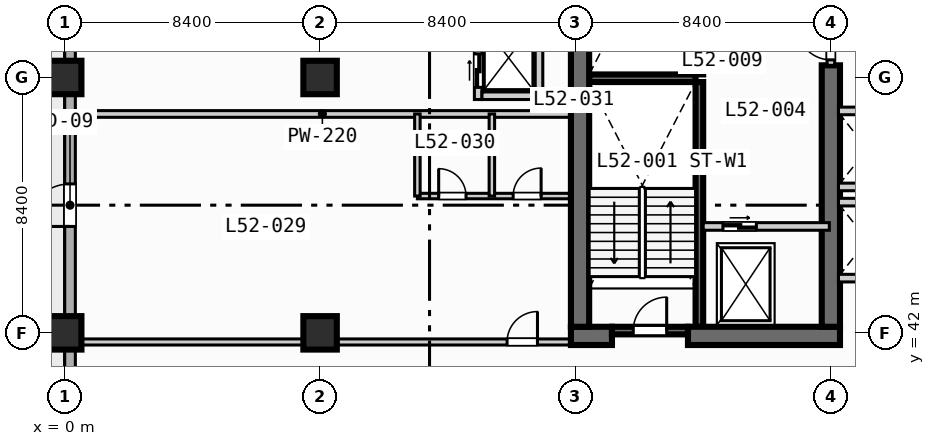
"""IFC4 building model, lengths in metres.
Left out: names, types, materials, properties, quantities, classifications, styles, units other than length and angle.
Written with IfcOpenShell. Run it as: python <this file> out.ifc"""

import sys

from ifc_helpers import new_model, si_unit, direction, frame, frame_2d, origin, origin_2d, place, context, subcontext, project, spatial, rectangle, extrude, element, fill, save


model = new_model("IFC4")
c1 = context("Model", 3, precision=1e-05, world=origin(), true_north=direction((0.0, 1.0)))
c2 = subcontext(c1, "Body", "Model", "MODEL_VIEW")
j1 = project(units=[si_unit("LENGTHUNIT", "METRE"), si_unit("PLANEANGLEUNIT", "RADIAN")], contexts=[c1])
p1 = place(None, origin())
s1 = spatial("IfcSite", under=j1, at=p1, CompositionType="ELEMENT")
p2 = place(p1, origin())
s2 = spatial("IfcBuilding", under=s1, at=p2, CompositionType="ELEMENT")
p3 = place(p2, frame((0.0, 0.0, 212.4)))
s3 = spatial("IfcBuildingStorey", under=s2, at=p3, CompositionType="ELEMENT", Elevation=212.4)
for number, where, z_axis, x_axis in (
    (1, (20.875, 42.2, 0.0), (0.0, 0.0, 1.0), (0.0, 1.0, 0.0)),
    (2, (20.875, 50.5, 0.0), (0.0, 0.0, 1.0), (0.0, 1.0, 0.0)),
):
    element("IfcWall", number, at=place(p3, frame(where, z_axis=z_axis, x_axis=x_axis)), inside=s3, PredefinedType="SOLIDWALL", context=c2, shape_type="SweptSolid", body=[
        extrude(rectangle(XDim=8.05, YDim=0.25, at=frame_2d((4.025, 0.0))), origin(), (0.0, 0.0, 1.0), 3.47),
    ])
p4 = place(p3, frame((17.25, 50.375, 0.0), z_axis=(0.0, 0.0, 1.0), x_axis=(1.0, 0.0, 0.0)))
e3 = element("IfcWall", 3, at=p4, inside=s3, PredefinedType="SOLIDWALL", context=c2, shape_type="SweptSolid", body=[
    extrude(rectangle(XDim=3.5, YDim=0.25, at=frame_2d((1.75, 0.0))), origin(), (0.0, 0.0, 1.0), 3.47),
])
p5 = place(p3, frame((16.65, 41.9, 0.0), z_axis=(0.0, 0.0, 1.0), x_axis=(1.0, 0.0, 0.0)))
e4 = element("IfcWall", 4, at=p5, inside=s3, PredefinedType="SHEAR", context=c2, shape_type="SweptSolid", body=[
    extrude(rectangle(XDim=1.35, YDim=0.6, at=frame_2d((0.675, 0.0))), origin(), (0.0, 0.0, 1.0), 3.47),
])
p6 = place(p3, frame((20.5, 41.9, 0.0), z_axis=(0.0, 0.0, 1.0), x_axis=(1.0, 0.0, 0.0)))
e5 = element("IfcWall", 5, at=p6, inside=s3, PredefinedType="SHEAR", context=c2, shape_type="SweptSolid", body=[
    extrude(rectangle(XDim=5.0, YDim=0.6, at=frame_2d((2.5, 0.0))), origin(), (0.0, 0.0, 1.0), 3.47),
])
p7 = place(p3, frame((16.95, 42.2, 0.0), z_axis=(0.0, 0.0, 1.0), x_axis=(0.0, 1.0, 0.0)))
e6 = element("IfcWall", 6, at=p7, inside=s3, PredefinedType="SHEAR", context=c2, shape_type="SweptSolid", body=[
    extrude(rectangle(XDim=16.35, YDim=0.6, at=frame_2d((8.175, 0.0))), origin(), (0.0, 0.0, 1.0), 3.47),
])
p8 = place(p3, frame((25.2, 42.2, 0.0), z_axis=(0.0, 0.0, 1.0), x_axis=(0.0, 1.0, 0.0)))
e7 = element("IfcWall", 7, at=p8, inside=s3, PredefinedType="SHEAR", context=c2, shape_type="SweptSolid", body=[
    extrude(rectangle(XDim=8.6, YDim=0.6, at=frame_2d((4.3, 0.0))), origin(), (0.0, 0.0, 1.0), 3.47),
])
for number, where, z_axis, x_axis in (
    (8, (0.0, 42.0, 0.0), (0.0, 0.0, 1.0), (1.0, 0.0, 0.0)),
    (9, (0.0, 50.4, 0.0), (0.0, 0.0, 1.0), (1.0, 0.0, 0.0)),
    (10, (8.4, 42.0, 0.0), (0.0, 0.0, 1.0), (1.0, 0.0, 0.0)),
    (11, (8.4, 50.4, 0.0), (0.0, 0.0, 1.0), (1.0, 0.0, 0.0)),
):
    element("IfcColumn", number, at=place(p3, frame(where, z_axis=z_axis, x_axis=x_axis)), inside=s3, PredefinedType="COLUMN", context=c2, shape_type="SweptSolid", body=[
        extrude(rectangle(XDim=1.1, YDim=1.1, at=origin_2d()), origin(), (0.0, 0.0, 1.0), 3.7),
    ])
p9 = place(p3, frame((0.175, 3.175, 0.0), z_axis=(0.0, 0.0, 1.0), x_axis=(0.0, 1.0, 0.0)))
e12 = element("IfcWall", 12, at=p9, inside=s3, PredefinedType="STANDARD", context=c2, shape_type="SweptSolid", body=[
    extrude(rectangle(XDim=69.25, YDim=0.35, at=frame_2d((34.625, 0.0))), origin(), (0.0, 0.0, 1.0), 3.47),
])
p10 = place(p9, frame((42.325, 0.0, 0.0)))
e13 = element("IfcOpeningElement", 13, at=p10, cuts=e12, PredefinedType="OPENING", context=c2, shape_type="SweptSolid", body=[
    extrude(rectangle(XDim=1.4, YDim=2.2, at=frame_2d((0.7, 1.1))), frame((0.0, 0.185, 0.0), z_axis=(0.0, -1.0, 0.0), x_axis=(1.0, 0.0, 0.0)), (0.0, 0.0, 1.0), 0.37),
])
p11 = place(p9, frame((25.025, 0.0, 0.85)))
e14 = element("IfcOpeningElement", 14, at=p11, cuts=e12, PredefinedType="OPENING", context=c2, shape_type="SweptSolid", body=[
    extrude(rectangle(XDim=2.4, YDim=1.95, at=frame_2d((1.2, 0.975))), frame((0.0, 0.185, 0.0), z_axis=(0.0, -1.0, 0.0), x_axis=(1.0, 0.0, 0.0)), (0.0, 0.0, 1.0), 0.37),
])
p12 = place(p9, frame((33.725, 0.0, 0.85)))
e15 = element("IfcOpeningElement", 15, at=p12, cuts=e12, PredefinedType="OPENING", context=c2, shape_type="SweptSolid", body=[
    extrude(rectangle(XDim=1.8, YDim=1.8, at=frame_2d((0.9, 0.9))), frame((0.0, 0.185, 0.0), z_axis=(0.0, -1.0, 0.0), x_axis=(1.0, 0.0, 0.0)), (0.0, 0.0, 1.0), 0.37),
])
p13 = place(p9, frame((58.375, 0.0, 0.85)))
e16 = element("IfcOpeningElement", 16, at=p13, cuts=e12, PredefinedType="OPENING", context=c2, shape_type="SweptSolid", body=[
    extrude(rectangle(XDim=1.8, YDim=1.8, at=frame_2d((0.9, 0.9))), frame((0.0, 0.185, 0.0), z_axis=(0.0, -1.0, 0.0), x_axis=(1.0, 0.0, 0.0)), (0.0, 0.0, 1.0), 0.37),
])
p14 = place(p9, frame((64.775, 0.0, 0.85)))
e17 = element("IfcOpeningElement", 17, at=p14, cuts=e12, PredefinedType="OPENING", context=c2, shape_type="SweptSolid", body=[
    extrude(rectangle(XDim=1.8, YDim=1.8, at=frame_2d((0.9, 0.9))), frame((0.0, 0.185, 0.0), z_axis=(0.0, -1.0, 0.0), x_axis=(1.0, 0.0, 0.0)), (0.0, 0.0, 1.0), 0.37),
])
p15 = place(p3, frame((18.0, 42.075, 0.0), z_axis=(0.0, 0.0, 1.0), x_axis=(1.0, 0.0, 0.0)))
e18 = element("IfcWall", 18, at=p15, inside=s3, PredefinedType="SOLIDWALL", context=c2, shape_type="SweptSolid", body=[
    extrude(rectangle(XDim=2.5, YDim=0.25, at=frame_2d((1.25, 0.0))), origin(), (0.0, 0.0, 1.0), 3.47),
])
p16 = place(p15, frame((0.7, 0.0, 0.0)))
e19 = element("IfcOpeningElement", 19, at=p16, cuts=e18, PredefinedType="OPENING", context=c2, shape_type="SweptSolid", body=[
    extrude(rectangle(XDim=1.1, YDim=2.15, at=frame_2d((0.55, 1.075))), frame((0.0, 0.135, 0.0), z_axis=(0.0, -1.0, 0.0), x_axis=(1.0, 0.0, 0.0)), (0.0, 0.0, 1.0), 0.27),
])
p17 = place(p3, frame((21.0, 45.5, 0.0), z_axis=(0.0, 0.0, 1.0), x_axis=(1.0, 0.0, 0.0)))
e20 = element("IfcWall", 20, at=p17, inside=s3, PredefinedType="SOLIDWALL", context=c2, shape_type="SweptSolid", body=[
    extrude(rectangle(XDim=4.15, YDim=0.25, at=frame_2d((2.075, 0.0))), origin(), (0.0, 0.0, 1.0), 3.47),
])
p18 = place(p17, frame((0.65, 0.0, 0.0)))
e21 = element("IfcOpeningElement", 21, at=p18, cuts=e20, PredefinedType="OPENING", context=c2, shape_type="SweptSolid", body=[
    extrude(rectangle(XDim=1.1, YDim=2.15, at=frame_2d((0.55, 1.075))), frame((0.0, 0.135, 0.0), z_axis=(0.0, -1.0, 0.0), x_axis=(1.0, 0.0, 0.0)), (0.0, 0.0, 1.0), 0.27),
])
p19 = place(p3, frame((25.2, 50.8, 0.0), z_axis=(0.0, 0.0, 1.0), x_axis=(0.0, 1.0, 0.0)))
e22 = element("IfcWall", 22, at=p19, inside=s3, PredefinedType="SOLIDWALL", context=c2, shape_type="SweptSolid", body=[
    extrude(rectangle(XDim=1.48, YDim=0.25, at=frame_2d((0.74, 0.0))), origin(), (0.0, 0.0, 1.0), 3.47),
])
p20 = place(p19, frame((0.18, 0.0, 0.0)))
e23 = element("IfcOpeningElement", 23, at=p20, cuts=e22, PredefinedType="OPENING", context=c2, shape_type="SweptSolid", body=[
    extrude(rectangle(XDim=1.1, YDim=2.15, at=frame_2d((0.55, 1.075))), frame((0.0, 0.135, 0.0), z_axis=(0.0, -1.0, 0.0), x_axis=(1.0, 0.0, 0.0)), (0.0, 0.0, 1.0), 0.27),
])
p21 = place(p3, frame((13.6, 49.675, 0.0), z_axis=(0.0, 0.0, 1.0), x_axis=(0.0, 1.0, 0.0)))
e24 = element("IfcWall", 24, at=p21, inside=s3, PredefinedType="SOLIDWALL", context=c2, shape_type="SweptSolid", body=[
    extrude(rectangle(XDim=2.75, YDim=0.25, at=frame_2d((1.375, 0.0))), origin(), (0.0, 0.0, 1.0), 3.47),
])
p22 = place(p21, frame((0.4, 0.0, 0.0)))
e25 = element("IfcOpeningElement", 25, at=p22, cuts=e24, PredefinedType="OPENING", context=c2, shape_type="SweptSolid", body=[
    extrude(rectangle(XDim=1.1, YDim=2.15, at=frame_2d((0.55, 1.075))), frame((0.0, 0.135, 0.0), z_axis=(0.0, -1.0, 0.0), x_axis=(1.0, 0.0, 0.0)), (0.0, 0.0, 1.0), 0.27),
])
p23 = place(p3, frame((15.6, 49.675, 0.0), z_axis=(0.0, 0.0, 1.0), x_axis=(0.0, 1.0, 0.0)))
e26 = element("IfcWall", 26, at=p23, inside=s3, PredefinedType="SOLIDWALL", context=c2, shape_type="SweptSolid", body=[
    extrude(rectangle(XDim=2.75, YDim=0.25, at=frame_2d((1.375, 0.0))), origin(), (0.0, 0.0, 1.0), 3.47),
])
p24 = place(p3, frame((13.725, 49.8, 0.0), z_axis=(0.0, 0.0, 1.0), x_axis=(1.0, 0.0, 0.0)))
e27 = element("IfcWall", 27, at=p24, inside=s3, PredefinedType="SOLIDWALL", context=c2, shape_type="SweptSolid", body=[
    extrude(rectangle(XDim=1.75, YDim=0.25, at=frame_2d((0.875, 0.0))), origin(), (0.0, 0.0, 1.0), 3.47),
])
for number, where, z_axis, x_axis in (
    (28, (25.45, 43.8, 0.0), (0.0, 0.0, 1.0), (1.0, 0.0, 0.0)),
    (29, (25.45, 46.3, 0.0), (0.0, 0.0, 1.0), (1.0, 0.0, 0.0)),
    (30, (25.45, 46.8, 0.0), (0.0, 0.0, 1.0), (1.0, 0.0, 0.0)),
    (31, (25.45, 49.3, 0.0), (0.0, 0.0, 1.0), (1.0, 0.0, 0.0)),
):
    element("IfcWall", number, at=place(p3, frame(where, z_axis=z_axis, x_axis=x_axis)), inside=s3, PredefinedType="SOLIDWALL", context=c2, shape_type="SweptSolid", body=[
        extrude(rectangle(XDim=1.825, YDim=0.25, at=frame_2d((0.913, 0.0))), origin(), (0.0, 0.0, 1.0), 3.47),
    ])
p25 = place(p3, frame((0.35, 41.7, 0.0), z_axis=(0.0, 0.0, 1.0), x_axis=(1.0, 0.0, 0.0)))
e32 = element("IfcWall", 32, at=p25, inside=s3, PredefinedType="PARTITIONING", context=c2, shape_type="SweptSolid", body=[
    extrude(rectangle(XDim=16.25, YDim=0.2, at=frame_2d((8.125, 0.0))), origin(), (0.0, 0.0, 1.0), 2.82),
])
p26 = place(p25, frame((14.2, 0.0, 0.0)))
e33 = element("IfcOpeningElement", 33, at=p26, cuts=e32, PredefinedType="OPENING", context=c2, shape_type="SweptSolid", body=[
    extrude(rectangle(XDim=1.0, YDim=2.15, at=frame_2d((0.5, 1.075))), frame((0.0, 0.11, 0.0), z_axis=(0.0, -1.0, 0.0), x_axis=(1.0, 0.0, 0.0)), (0.0, 0.0, 1.0), 0.22),
])
p27 = place(p3, frame((0.35, 49.2, 0.0), z_axis=(0.0, 0.0, 1.0), x_axis=(1.0, 0.0, 0.0)))
e34 = element("IfcWall", 34, at=p27, inside=s3, PredefinedType="PARTITIONING", context=c2, shape_type="SweptSolid", body=[
    extrude(rectangle(XDim=16.25, YDim=0.22, at=frame_2d((8.125, 0.0))), origin(), (0.0, 0.0, 1.0), 3.47),
])
p28 = place(p3, frame((11.6, 46.5, 0.0), z_axis=(0.0, 0.0, 1.0), x_axis=(1.0, 0.0, 0.0)))
e35 = element("IfcWall", 35, at=p28, inside=s3, PredefinedType="PLUMBINGWALL", context=c2, shape_type="SweptSolid", body=[
    extrude(rectangle(XDim=5.0, YDim=0.18, at=frame_2d((2.5, 0.0))), origin(), (0.0, 0.0, 1.0), 3.47),
])
p29 = place(p28, frame((0.7, 0.0, 0.0)))
e36 = element("IfcOpeningElement", 36, at=p29, cuts=e35, PredefinedType="OPENING", context=c2, shape_type="SweptSolid", body=[
    extrude(rectangle(XDim=0.9, YDim=2.1, at=frame_2d((0.45, 1.05))), frame((0.0, 0.1, 0.0), z_axis=(0.0, -1.0, 0.0), x_axis=(1.0, 0.0, 0.0)), (0.0, 0.0, 1.0), 0.2),
])
p30 = place(p28, frame((3.15, 0.0, 0.0)))
e37 = element("IfcOpeningElement", 37, at=p30, cuts=e35, PredefinedType="OPENING", context=c2, shape_type="SweptSolid", body=[
    extrude(rectangle(XDim=0.92, YDim=2.1, at=frame_2d((0.46, 1.05))), frame((0.0, 0.1, 0.0), z_axis=(0.0, -1.0, 0.0), x_axis=(1.0, 0.0, 0.0)), (0.0, 0.0, 1.0), 0.2),
])
for number, where, z_axis, x_axis in (
    (38, (11.6, 46.5, 0.0), (0.0, 0.0, 1.0), (0.0, 1.0, 0.0)),
    (39, (14.05, 46.5, 0.0), (0.0, 0.0, 1.0), (0.0, 1.0, 0.0)),
):
    element("IfcWall", number, at=place(p3, frame(where, z_axis=z_axis, x_axis=x_axis)), inside=s3, PredefinedType="PLUMBINGWALL", context=c2, shape_type="SweptSolid", body=[
        extrude(rectangle(XDim=2.7, YDim=0.18, at=frame_2d((1.35, 0.0))), origin(), (0.0, 0.0, 1.0), 3.47),
    ])
p31 = place(p10, origin())
e40 = element("IfcDoor", 40, at=p31, inside=s3, OperationType="SINGLE_SWING_LEFT", PredefinedType="DOOR", context=c2, shape_type="SweptSolid", body=[
    extrude(rectangle(XDim=1.4, YDim=2.2, at=frame_2d((0.7, 1.1))), frame((0.0, 0.025, 0.0), z_axis=(0.0, -1.0, 0.0), x_axis=(1.0, 0.0, 0.0)), (0.0, 0.0, 1.0), 0.05),
])
fill(e13, e40)
p32 = place(p16, origin())
e41 = element("IfcDoor", 41, at=p32, inside=s3, OperationType="SINGLE_SWING_RIGHT", PredefinedType="DOOR", context=c2, shape_type="SweptSolid", body=[
    extrude(rectangle(XDim=1.1, YDim=2.15, at=frame_2d((0.55, 1.075))), frame((0.0, 0.025, 0.0), z_axis=(0.0, -1.0, 0.0), x_axis=(1.0, 0.0, 0.0)), (0.0, 0.0, 1.0), 0.05),
])
fill(e19, e41)
p33 = place(p18, origin())
e42 = element("IfcDoor", 42, at=p33, inside=s3, OperationType="SLIDING_TO_LEFT", PredefinedType="DOOR", context=c2, shape_type="SweptSolid", body=[
    extrude(rectangle(XDim=1.1, YDim=2.15, at=frame_2d((0.55, 1.075))), frame((0.0, 0.025, 0.0), z_axis=(0.0, -1.0, 0.0), x_axis=(1.0, 0.0, 0.0)), (0.0, 0.0, 1.0), 0.05),
])
fill(e21, e42)
p34 = place(p20, origin())
e43 = element("IfcDoor", 43, at=p34, inside=s3, OperationType="SINGLE_SWING_RIGHT", PredefinedType="DOOR", context=c2, shape_type="SweptSolid", body=[
    extrude(rectangle(XDim=1.1, YDim=2.15, at=frame_2d((0.55, 1.075))), frame((0.0, 0.025, 0.0), z_axis=(0.0, -1.0, 0.0), x_axis=(1.0, 0.0, 0.0)), (0.0, 0.0, 1.0), 0.05),
])
fill(e23, e43)
p35 = place(p22, origin())
e44 = element("IfcDoor", 44, at=p35, inside=s3, OperationType="SLIDING_TO_LEFT", PredefinedType="DOOR", context=c2, shape_type="SweptSolid", body=[
    extrude(rectangle(XDim=1.1, YDim=2.15, at=frame_2d((0.55, 1.075))), frame((0.0, 0.025, 0.0), z_axis=(0.0, -1.0, 0.0), x_axis=(1.0, 0.0, 0.0)), (0.0, 0.0, 1.0), 0.05),
])
fill(e25, e44)
p36 = place(p26, origin())
e45 = element("IfcDoor", 45, at=p36, inside=s3, OperationType="SINGLE_SWING_RIGHT", PredefinedType="DOOR", context=c2, shape_type="SweptSolid", body=[
    extrude(rectangle(XDim=1.0, YDim=2.15, at=frame_2d((0.5, 1.075))), frame((0.0, 0.025, 0.0), z_axis=(0.0, -1.0, 0.0), x_axis=(1.0, 0.0, 0.0)), (0.0, 0.0, 1.0), 0.05),
])
fill(e33, e45)
p37 = place(p29, origin())
e46 = element("IfcDoor", 46, at=p37, inside=s3, OperationType="SINGLE_SWING_LEFT", PredefinedType="DOOR", context=c2, shape_type="SweptSolid", body=[
    extrude(rectangle(XDim=0.9, YDim=2.1, at=frame_2d((0.45, 1.05))), frame((0.0, 0.025, 0.0), z_axis=(0.0, -1.0, 0.0), x_axis=(1.0, 0.0, 0.0)), (0.0, 0.0, 1.0), 0.05),
])
fill(e36, e46)
p38 = place(p30, origin())
e47 = element("IfcDoor", 47, at=p38, inside=s3, OperationType="SINGLE_SWING_RIGHT", PredefinedType="DOOR", context=c2, shape_type="SweptSolid", body=[
    extrude(rectangle(XDim=0.92, YDim=2.1, at=frame_2d((0.46, 1.05))), frame((0.0, 0.025, 0.0), z_axis=(0.0, -1.0, 0.0), x_axis=(1.0, 0.0, 0.0)), (0.0, 0.0, 1.0), 0.05),
])
fill(e37, e47)
save(model, sys.argv[1])
